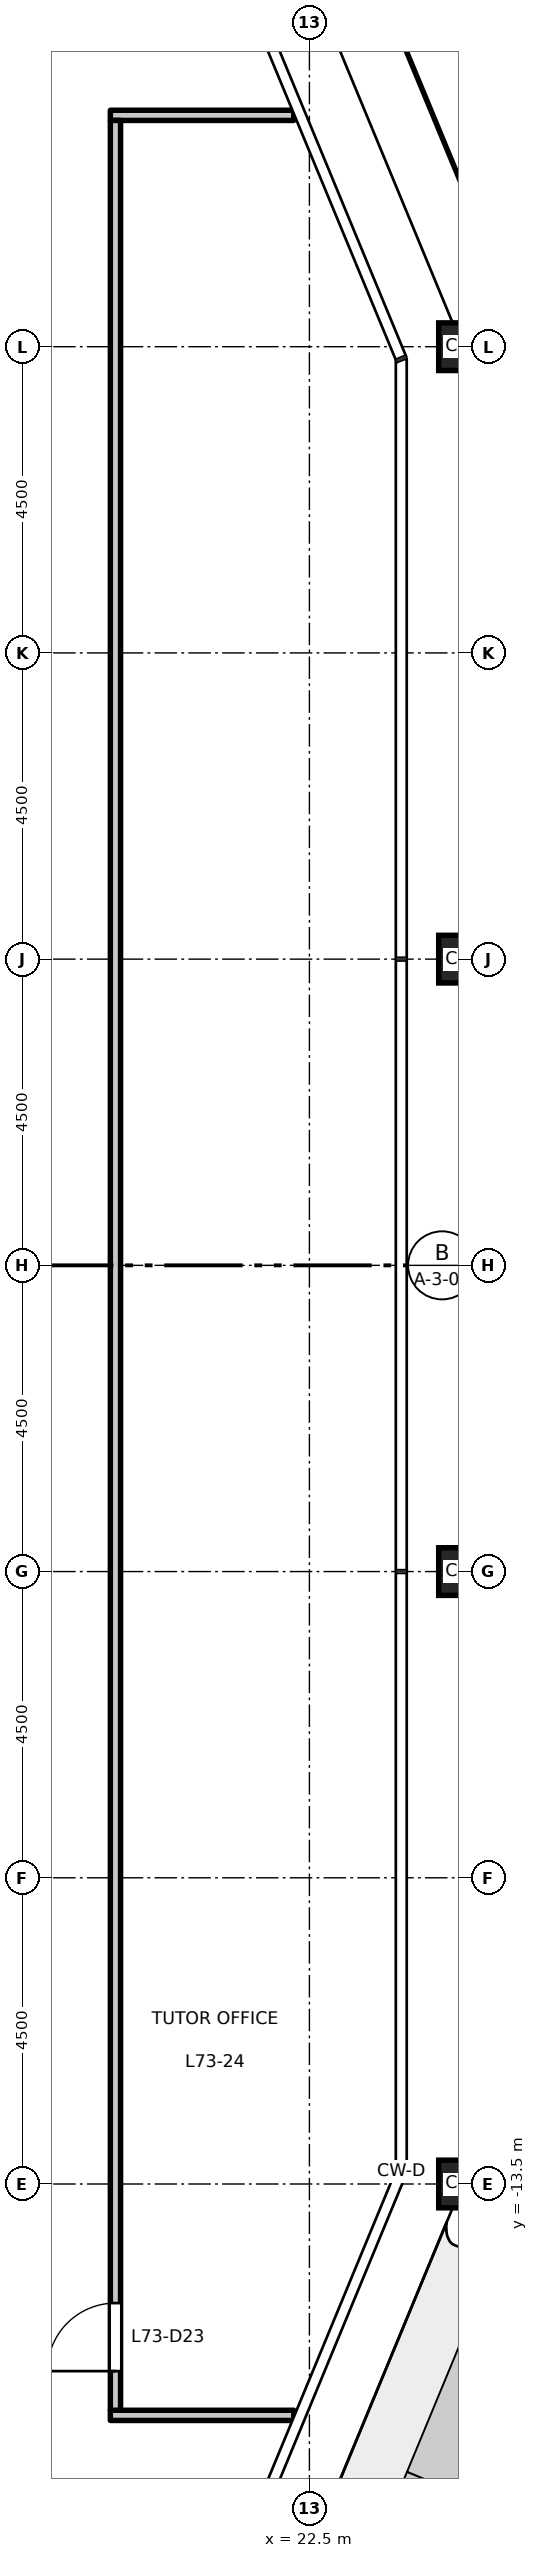
"""IFC4 building model, lengths in metres.
Left out: names, types, materials, properties, quantities, classifications, styles, units other than length and angle.
Written with IfcOpenShell. Run it as: python <this file> out.ifc"""

import sys

from ifc_helpers import new_model, si_unit, direction, frame, frame_2d, origin, origin_2d, place, context, subcontext, project, spatial, rectangle, hollow_rectangle, extrude, element, fill, save


model = new_model("IFC4")
c1 = context("Model", 3, precision=1e-05, world=origin(), true_north=direction((0.0, 1.0)))
c2 = subcontext(c1, "Body", "Model", "MODEL_VIEW")
j1 = project(units=[si_unit("LENGTHUNIT", "METRE"), si_unit("PLANEANGLEUNIT", "RADIAN")], contexts=[c1])
p1 = place(None, origin())
s1 = spatial("IfcSite", under=j1, at=p1, CompositionType="ELEMENT")
p2 = place(p1, origin())
s2 = spatial("IfcBuilding", under=s1, at=p2, CompositionType="ELEMENT")
p3 = place(p2, frame((0.0, 0.0, 339.2)))
s3 = spatial("IfcBuildingStorey", under=s2, at=p3, CompositionType="ELEMENT", Elevation=339.2)
for number, where, z_axis, x_axis in (
    (1, (24.75, -13.5, 0.0), (0.0, 0.0, 1.0), (1.0, 0.0, 0.0)),
    (2, (24.75, -4.5, 0.0), (0.0, 0.0, 1.0), (1.0, 0.0, 0.0)),
    (3, (24.75, 4.5, 0.0), (0.0, 0.0, 1.0), (1.0, 0.0, 0.0)),
    (4, (24.75, 13.5, 0.0), (0.0, 0.0, 1.0), (1.0, 0.0, 0.0)),
):
    element("IfcColumn", number, at=place(p3, frame(where, z_axis=z_axis, x_axis=x_axis)), inside=s3, PredefinedType="COLUMN", context=c2, shape_type="SweptSolid", body=[
        extrude(hollow_rectangle(XDim=0.7, YDim=0.7, WallThickness=0.036, at=origin_2d()), origin(), (0.0, 0.0, 1.0), 4.5),
    ])
for number, where, z_axis, x_axis in (
    (5, (19.575, -16.9, 0.0), (0.0, 0.0, 1.0), (1.0, 0.0, 0.0)),
    (6, (19.575, 16.9, 0.0), (0.0, 0.0, 1.0), (1.0, 0.0, 0.0)),
):
    element("IfcWall", number, at=place(p3, frame(where, z_axis=z_axis, x_axis=x_axis)), inside=s3, PredefinedType="PARTITIONING", context=c2, shape_type="SweptSolid", body=[
        extrude(rectangle(XDim=2.695, YDim=0.15, at=frame_2d((1.348, 0.0))), origin(), (0.0, 0.0, 1.0), 4.35),
    ])
p4 = place(p3, frame((19.65, -16.825, 0.0), z_axis=(0.0, 0.0, 1.0), x_axis=(0.0, 1.0, 0.0)))
e7 = element("IfcWall", 7, at=p4, inside=s3, PredefinedType="PARTITIONING", context=c2, shape_type="SweptSolid", body=[
    extrude(rectangle(XDim=33.65, YDim=0.15, at=frame_2d((16.825, 0.0))), origin(), (0.0, 0.0, 1.0), 4.35),
])
p5 = place(p4, frame((0.575, 0.0, 0.0)))
e8 = element("IfcOpeningElement", 8, at=p5, cuts=e7, PredefinedType="OPENING", context=c2, shape_type="SweptSolid", body=[
    extrude(rectangle(XDim=1.0, YDim=2.1, at=frame_2d((0.5, 1.05))), frame((0.0, 0.085, 0.0), z_axis=(0.0, -1.0, 0.0), x_axis=(1.0, 0.0, 0.0)), (0.0, 0.0, 1.0), 0.17),
])
p6 = place(p5, origin())
e9 = element("IfcDoor", 9, at=p6, inside=s3, OperationType="SINGLE_SWING_LEFT", PredefinedType="DOOR", context=c2, shape_type="SweptSolid", body=[
    extrude(rectangle(XDim=1.0, YDim=2.1, at=frame_2d((0.5, 1.05))), frame((0.0, 0.025, 0.0), z_axis=(0.0, -1.0, 0.0), x_axis=(1.0, 0.0, 0.0)), (0.0, 0.0, 1.0), 0.05),
])
fill(e8, e9)
save(model, sys.argv[1])
